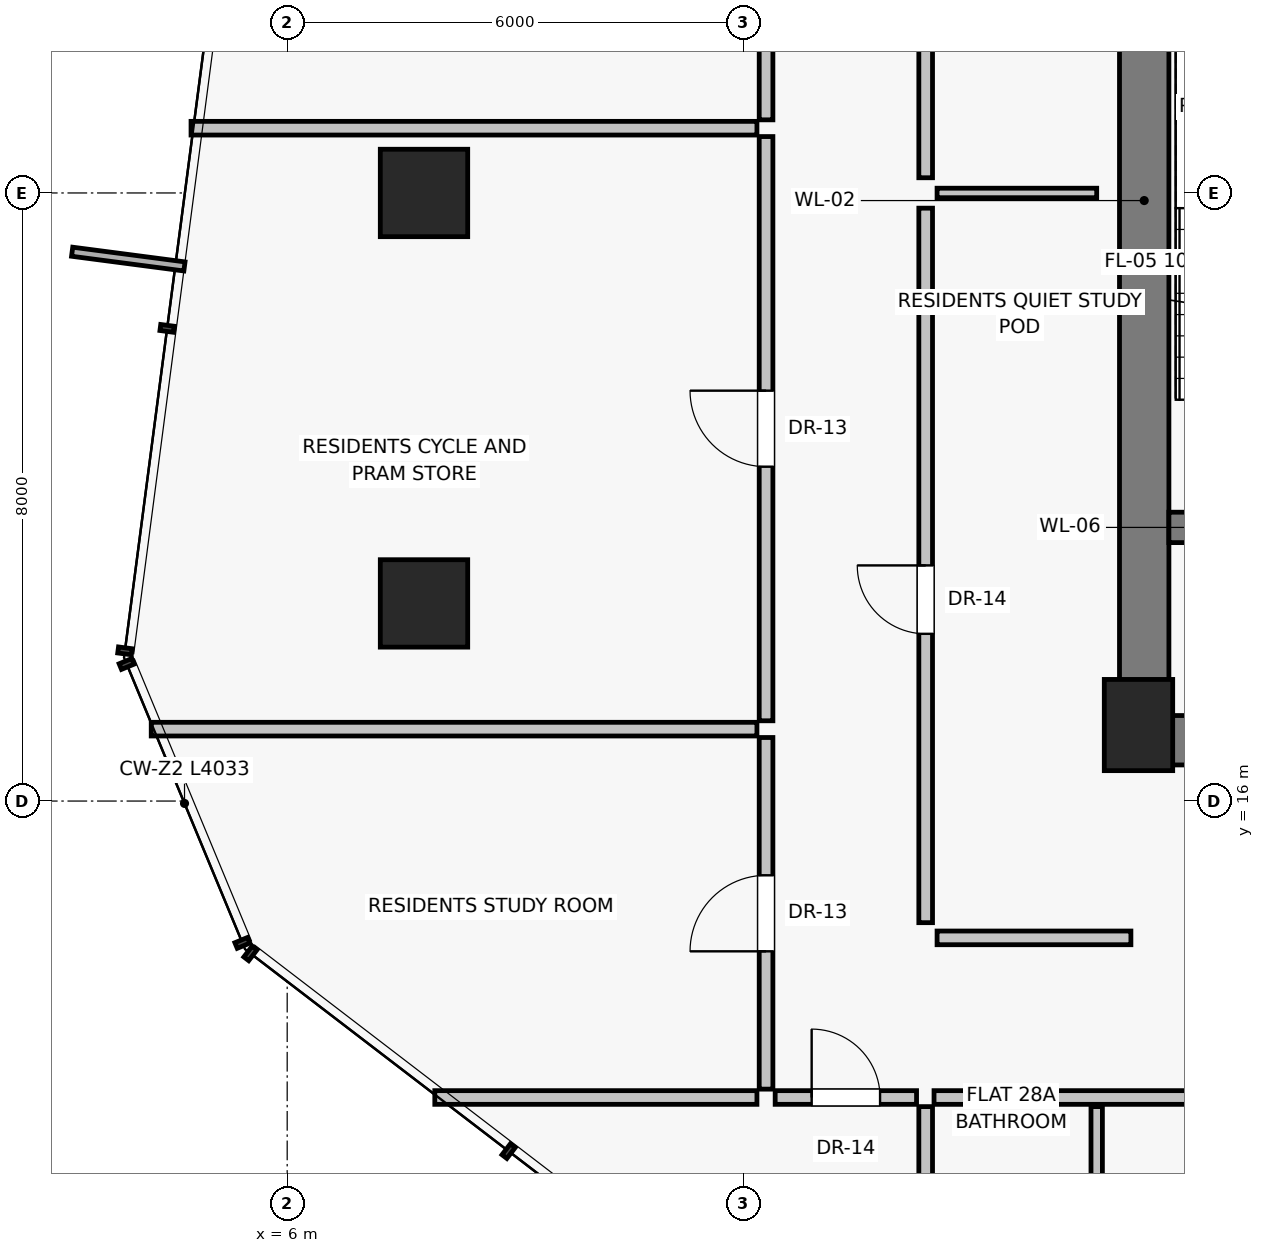
"""IFC4 building model, lengths in metres.
Left out: names, types, materials, properties, quantities, classifications, styles, units other than length and angle.
Written with IfcOpenShell. Run it as: python <this file> out.ifc"""

import sys

from ifc_helpers import new_model, si_unit, direction, frame, frame_2d, origin, origin_2d, place, context, subcontext, project, spatial, rectangle, extrude, source, transform, mapped, element, fill, save


model = new_model("IFC4")
c1 = context("Model", 3, precision=1e-05, world=origin(), true_north=direction((0.0, 1.0)))
c2 = subcontext(c1, "Body", "Model", "MODEL_VIEW")
j1 = project(units=[si_unit("LENGTHUNIT", "METRE"), si_unit("PLANEANGLEUNIT", "RADIAN")], contexts=[c1])
p1 = place(None, origin())
s1 = spatial("IfcSite", under=j1, at=p1, CompositionType="ELEMENT")
p2 = place(p1, origin())
s2 = spatial("IfcBuilding", under=s1, at=p2, CompositionType="ELEMENT")
p3 = place(p2, frame((0.0, 0.0, 102.45)))
s3 = spatial("IfcBuildingStorey", under=s2, at=p3, CompositionType="ELEMENT", Elevation=102.45)
p4 = place(p3, frame((17.2, 17.0, 0.0), z_axis=(0.0, 0.0, 1.0), x_axis=(1.0, 0.0, 0.0)))
e1 = element("IfcColumn", 1, at=p4, inside=s3, PredefinedType="PILASTER", context=c2, shape_type="SweptSolid", body=[
    extrude(rectangle(XDim=0.9, YDim=1.2, at=origin_2d()), origin(), (0.0, 0.0, 1.0), 3.25),
])
for number, where, z_axis, x_axis in (
    (2, (7.8, 24.0, 0.0), (0.0, 0.0, 1.0), (1.0, 0.0, 0.0)),
    (3, (7.8, 18.6, 0.0), (0.0, 0.0, 1.0), (1.0, 0.0, 0.0)),
):
    element("IfcColumn", number, at=place(p3, frame(where, z_axis=z_axis, x_axis=x_axis)), inside=s3, PredefinedType="COLUMN", context=c2, shape_type="SweptSolid", body=[
        extrude(rectangle(XDim=1.15, YDim=1.15, at=origin_2d()), origin(), (0.0, 0.0, 1.0), 3.25),
    ])
p5 = place(p3, frame((17.275, 16.8, 0.0), z_axis=(0.0, 0.0, 1.0), x_axis=(0.0, 1.0, 0.0)))
e4 = element("IfcWall", 4, at=p5, inside=s3, PredefinedType="SHEAR", context=c2, shape_type="SweptSolid", body=[
    extrude(rectangle(XDim=14.2, YDim=0.65, at=frame_2d((7.1, 0.0))), origin(), (0.0, 0.0, 1.0), 3.0),
])
p6 = place(p3, frame((17.2, 16.8, 0.0), z_axis=(0.0, 0.0, 1.0), x_axis=(1.0, 0.0, 0.0)))
e5 = element("IfcWall", 5, at=p6, inside=s3, PredefinedType="SHEAR", context=c2, shape_type="SweptSolid", body=[
    extrude(rectangle(XDim=5.85, YDim=0.65, at=frame_2d((2.925, 0.0))), origin(), (0.0, 0.0, 1.0), 3.0),
])
p7 = place(p6, frame((1.15, 0.0, 0.0)))
e6 = element("IfcOpeningElement", 6, at=p7, cuts=e5, PredefinedType="OPENING", context=c2, shape_type="SweptSolid", body=[
    extrude(rectangle(XDim=1.2, YDim=2.03, at=frame_2d((0.6, 1.015))), frame((0.0, 0.335, 0.0), z_axis=(0.0, -1.0, 0.0), x_axis=(1.0, 0.0, 0.0)), (0.0, 0.0, 1.0), 0.67),
])
p8 = place(p3, frame((17.6, 19.6, 0.0), z_axis=(0.0, 0.0, 1.0), x_axis=(1.0, 0.0, 0.0)))
e7 = element("IfcWall", 7, at=p8, inside=s3, PredefinedType="SHEAR", context=c2, shape_type="SweptSolid", body=[
    extrude(rectangle(XDim=3.4, YDim=0.4, at=frame_2d((1.7, 0.0))), origin(), (0.0, 0.0, 1.0), 3.0),
])
p9 = place(p8, frame((1.05, 0.0, 0.0)))
e8 = element("IfcOpeningElement", 8, at=p9, cuts=e7, PredefinedType="OPENING", context=c2, shape_type="SweptSolid", body=[
    extrude(rectangle(XDim=1.1, YDim=2.03, at=frame_2d((0.55, 1.015))), frame((0.0, 0.21, 0.0), z_axis=(0.0, -1.0, 0.0), x_axis=(1.0, 0.0, 0.0)), (0.0, 0.0, 1.0), 0.42),
])
p10 = place(p3, frame((14.4, 14.4, 0.0), z_axis=(0.0, 0.0, 1.0), x_axis=(0.0, 1.0, 0.0)))
e9 = element("IfcWall", 9, at=p10, inside=s3, PredefinedType="PARTITIONING", context=c2, shape_type="SweptSolid", body=[
    extrude(rectangle(XDim=9.4, YDim=0.18, at=frame_2d((4.7, 0.0))), origin(), (0.0, 0.0, 1.0), 3.0),
])
p11 = place(p10, frame((3.8, 0.0, 0.0)))
e10 = element("IfcOpeningElement", 10, at=p11, cuts=e9, PredefinedType="OPENING", context=c2, shape_type="SweptSolid", body=[
    extrude(rectangle(XDim=0.9, YDim=2.01, at=frame_2d((0.45, 1.005))), frame((0.0, 0.1, 0.0), z_axis=(0.0, -1.0, 0.0), x_axis=(1.0, 0.0, 0.0)), (0.0, 0.0, 1.0), 0.2),
])
p12 = place(p3, frame((14.4, 24.2, 0.0), z_axis=(0.0, 0.0, 1.0), x_axis=(0.0, 1.0, 0.0)))
e11 = element("IfcWall", 11, at=p12, inside=s3, PredefinedType="PARTITIONING", context=c2, shape_type="SweptSolid", body=[
    extrude(rectangle(XDim=9.2, YDim=0.18, at=frame_2d((4.6, 0.0))), origin(), (0.0, 0.0, 1.0), 3.0),
])
p13 = place(p12, frame((3.8, 0.0, 0.0)))
e12 = element("IfcOpeningElement", 12, at=p13, cuts=e11, PredefinedType="OPENING", context=c2, shape_type="SweptSolid", body=[
    extrude(rectangle(XDim=0.9, YDim=2.01, at=frame_2d((0.45, 1.005))), frame((0.0, 0.1, 0.0), z_axis=(0.0, -1.0, 0.0), x_axis=(1.0, 0.0, 0.0)), (0.0, 0.0, 1.0), 0.2),
])
p14 = place(p3, frame((14.55, 24.0, 0.0), z_axis=(0.0, 0.0, 1.0), x_axis=(1.0, 0.0, 0.0)))
e13 = element("IfcWall", 13, at=p14, inside=s3, PredefinedType="PARTITIONING", context=c2, shape_type="SweptSolid", body=[
    extrude(rectangle(XDim=2.1, YDim=0.125, at=frame_2d((1.05, 0.0))), origin(), (0.0, 0.0, 1.0), 3.0),
])
p15 = place(p3, frame((14.55, 14.2, 0.0), z_axis=(0.0, 0.0, 1.0), x_axis=(1.0, 0.0, 0.0)))
e14 = element("IfcWall", 14, at=p15, inside=s3, PredefinedType="PARTITIONING", context=c2, shape_type="SweptSolid", body=[
    extrude(rectangle(XDim=2.55, YDim=0.18, at=frame_2d((1.275, 0.0))), origin(), (0.0, 0.0, 1.0), 3.0),
])
p16 = place(p3, frame((14.4, 11.98, 0.0), z_axis=(0.0, 0.0, 1.0), x_axis=(0.0, -1.0, 0.0)))
e15 = element("IfcWall", 15, at=p16, inside=s3, PredefinedType="PARTITIONING", context=c2, shape_type="SweptSolid", body=[
    extrude(rectangle(XDim=4.828, YDim=0.18, at=frame_2d((2.414, 0.0))), origin(), (0.0, 0.0, 1.0), 3.0),
])
p17 = place(p3, frame((14.51, 12.1, 0.0), z_axis=(0.0, 0.0, 1.0), x_axis=(1.0, 0.0, 0.0)))
e16 = element("IfcWall", 16, at=p17, inside=s3, PredefinedType="PARTITIONING", context=c2, shape_type="SweptSolid", body=[
    extrude(rectangle(XDim=10.024, YDim=0.18, at=frame_2d((5.012, 0.0))), origin(), (0.0, 0.0, 1.0), 2.58),
])
p18 = place(p17, frame((3.408, 0.0, 0.0)))
e17 = element("IfcOpeningElement", 17, at=p18, cuts=e16, PredefinedType="OPENING", context=c2, shape_type="SweptSolid", body=[
    extrude(rectangle(XDim=0.95, YDim=2.02, at=frame_2d((0.475, 1.01))), frame((0.0, 0.1, 0.0), z_axis=(0.0, -1.0, 0.0), x_axis=(1.0, 0.0, 0.0)), (0.0, 0.0, 1.0), 0.2),
])
p19 = place(p3, frame((16.65, 11.98, 0.0), z_axis=(0.0, 0.0, 1.0), x_axis=(0.0, -1.0, 0.0)))
e18 = element("IfcWall", 18, at=p19, inside=s3, PredefinedType="PARTITIONING", context=c2, shape_type="SweptSolid", body=[
    extrude(rectangle(XDim=1.8, YDim=0.15, at=frame_2d((0.9, 0.0))), origin(), (0.0, 0.0, 1.0), 3.0),
])
p20 = place(p3, frame((12.18, 12.1, 0.0), z_axis=(0.0, 0.0, 1.0), x_axis=(-1.0, 0.0, 0.0)))
e19 = element("IfcWall", 19, at=p20, inside=s3, PredefinedType="PARTITIONING", context=c2, shape_type="SweptSolid", body=[
    extrude(rectangle(XDim=4.238, YDim=0.18, at=frame_2d((2.119, 0.0))), origin(), (0.0, 0.0, 1.0), 3.0),
])
p21 = place(p3, frame((12.3, 12.21, 0.0), z_axis=(0.0, 0.0, 1.0), x_axis=(0.0, 1.0, 0.0)))
e20 = element("IfcWall", 20, at=p21, inside=s3, PredefinedType="PARTITIONING", context=c2, shape_type="SweptSolid", body=[
    extrude(rectangle(XDim=4.626, YDim=0.18, at=frame_2d((2.313, 0.0))), origin(), (0.0, 0.0, 1.0), 3.0),
])
p22 = place(p21, frame((1.813, 0.0, 0.0)))
e21 = element("IfcOpeningElement", 21, at=p22, cuts=e20, PredefinedType="OPENING", context=c2, shape_type="SweptSolid", body=[
    extrude(rectangle(XDim=1.0, YDim=2.01, at=frame_2d((0.5, 1.005))), frame((0.0, 0.1, 0.0), z_axis=(0.0, -1.0, 0.0), x_axis=(1.0, 0.0, 0.0)), (0.0, 0.0, 1.0), 0.2),
])
p23 = place(p3, frame((12.3, 17.056, 0.0), z_axis=(0.0, 0.0, 1.0), x_axis=(0.0, 1.0, 0.0)))
e22 = element("IfcWall", 22, at=p23, inside=s3, PredefinedType="PARTITIONING", context=c2, shape_type="SweptSolid", body=[
    extrude(rectangle(XDim=7.686, YDim=0.18, at=frame_2d((3.843, 0.0))), origin(), (0.0, 0.0, 1.0), 2.58),
])
p24 = place(p23, frame((3.343, 0.0, 0.0)))
e23 = element("IfcOpeningElement", 23, at=p24, cuts=e22, PredefinedType="OPENING", context=c2, shape_type="SweptSolid", body=[
    extrude(rectangle(XDim=1.0, YDim=2.01, at=frame_2d((0.5, 1.005))), frame((0.0, 0.1, 0.0), z_axis=(0.0, -1.0, 0.0), x_axis=(1.0, 0.0, 0.0)), (0.0, 0.0, 1.0), 0.2),
])
p25 = place(p3, frame((12.18, 16.946, 0.0), z_axis=(0.0, 0.0, 1.0), x_axis=(-1.0, 0.0, 0.0)))
e24 = element("IfcWall", 24, at=p25, inside=s3, PredefinedType="PARTITIONING", context=c2, shape_type="SweptSolid", body=[
    extrude(rectangle(XDim=7.969, YDim=0.18, at=frame_2d((3.984, 0.0))), origin(), (0.0, 0.0, 1.0), 3.0),
])
p26 = place(p3, frame((12.18, 24.852, 0.0), z_axis=(0.0, 0.0, 1.0), x_axis=(-1.0, 0.0, 0.0)))
e25 = element("IfcWall", 25, at=p26, inside=s3, PredefinedType="PARTITIONING", context=c2, shape_type="SweptSolid", body=[
    extrude(rectangle(XDim=7.445, YDim=0.18, at=frame_2d((3.722, 0.0))), origin(), (0.0, 0.0, 1.0), 3.0),
])
p27 = place(p3, frame((12.3, 24.962, 0.0), z_axis=(0.0, 0.0, 1.0), x_axis=(0.0, 1.0, 0.0)))
e26 = element("IfcWall", 26, at=p27, inside=s3, PredefinedType="PARTITIONING", context=c2, shape_type="SweptSolid", body=[
    extrude(rectangle(XDim=3.902, YDim=0.18, at=frame_2d((1.951, 0.0))), origin(), (0.0, 0.0, 1.0), 2.58),
])
p28 = place(p27, frame((1.451, 0.0, 0.0)))
e27 = element("IfcOpeningElement", 27, at=p28, cuts=e26, PredefinedType="OPENING", context=c2, shape_type="SweptSolid", body=[
    extrude(rectangle(XDim=1.0, YDim=2.01, at=frame_2d((0.5, 1.005))), frame((0.0, 0.1, 0.0), z_axis=(0.0, -1.0, 0.0), x_axis=(1.0, 0.0, 0.0)), (0.0, 0.0, 1.0), 0.2),
])
p29 = place(p3, frame((12.42, 12.1, 0.0), z_axis=(0.0, 0.0, 1.0), x_axis=(1.0, 0.0, 0.0)))
e28 = element("IfcWall", 28, at=p29, inside=s3, PredefinedType="PARTITIONING", context=c2, shape_type="SweptSolid", body=[
    extrude(rectangle(XDim=1.86, YDim=0.18, at=frame_2d((0.93, 0.0))), origin(), (0.0, 0.0, 1.0), 3.0),
])
p30 = place(p29, frame((0.48, 0.0, 0.0)))
e29 = element("IfcOpeningElement", 29, at=p30, cuts=e28, PredefinedType="OPENING", context=c2, shape_type="SweptSolid", body=[
    extrude(rectangle(XDim=0.9, YDim=2.01, at=frame_2d((0.45, 1.005))), frame((0.0, 0.1, 0.0), z_axis=(0.0, -1.0, 0.0), x_axis=(1.0, 0.0, 0.0)), (0.0, 0.0, 1.0), 0.2),
])
m1 = source(origin(), c2, "Body", "SweptSolid", [
    extrude(rectangle(XDim=0.9, YDim=2.01, at=frame_2d((0.45, 1.005))), frame((0.0, 0.025, 0.0), z_axis=(0.0, -1.0, 0.0), x_axis=(1.0, 0.0, 0.0)), (0.0, 0.0, 1.0), 0.05),
])
p31 = place(p11, origin())
e30 = element("IfcDoor", 30, at=p31, inside=s3, OperationType="SINGLE_SWING_RIGHT", PredefinedType="DOOR", context=c2, shape_type="MappedRepresentation", body=[
    mapped(m1, transform((0.0, 0.0, 0.0), scale=1.0)),
])
fill(e10, e30)
m2 = source(origin(), c2, "Body", "SweptSolid", [
    extrude(rectangle(XDim=1.0, YDim=2.01, at=frame_2d((0.5, 1.005))), frame((0.0, 0.025, 0.0), z_axis=(0.0, -1.0, 0.0), x_axis=(1.0, 0.0, 0.0)), (0.0, 0.0, 1.0), 0.05),
])
p32 = place(p22, origin())
e31 = element("IfcDoor", 31, at=p32, inside=s3, OperationType="SINGLE_SWING_LEFT", PredefinedType="DOOR", context=c2, shape_type="MappedRepresentation", body=[
    mapped(m2, transform((0.0, 0.0, 0.0), scale=1.0)),
])
fill(e21, e31)
p33 = place(p24, origin())
e32 = element("IfcDoor", 32, at=p33, inside=s3, OperationType="SINGLE_SWING_RIGHT", PredefinedType="DOOR", context=c2, shape_type="MappedRepresentation", body=[
    mapped(m2, transform((0.0, 0.0, 0.0), scale=1.0)),
])
fill(e23, e32)
p34 = place(p30, origin())
e33 = element("IfcDoor", 33, at=p34, inside=s3, OperationType="SINGLE_SWING_LEFT", PredefinedType="DOOR", context=c2, shape_type="MappedRepresentation", body=[
    mapped(m1, transform((0.0, 0.0, 0.0), scale=1.0)),
])
fill(e29, e33)
save(model, sys.argv[1])
